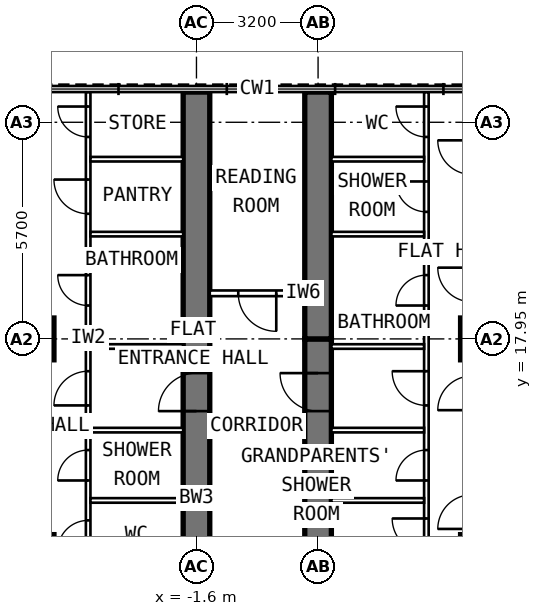
"""IFC4 building model, lengths in metres.
Left out: names, types, materials, properties, quantities, classifications, styles, units other than length and angle.
Written with IfcOpenShell. Run it as: python <this file> out.ifc"""

import sys

from ifc_helpers import new_model, si_unit, direction, frame, frame_2d, origin, origin_2d, place, context, subcontext, project, spatial, rectangle, extrude, element, fill, save


model = new_model("IFC4")
c1 = context("Model", 3, precision=1e-05, world=origin(), true_north=direction((0.0, 1.0)))
c2 = subcontext(c1, "Body", "Model", "MODEL_VIEW")
j1 = project(units=[si_unit("LENGTHUNIT", "METRE"), si_unit("PLANEANGLEUNIT", "RADIAN")], contexts=[c1])
p1 = place(None, origin())
s1 = spatial("IfcSite", under=j1, at=p1, CompositionType="ELEMENT")
p2 = place(p1, origin())
s2 = spatial("IfcBuilding", under=s1, at=p2, CompositionType="ELEMENT")
p3 = place(p2, frame((0.0, 0.0, 197.4)))
s3 = spatial("IfcBuildingStorey", under=s2, at=p3, CompositionType="ELEMENT", Elevation=197.4)
for number, where, z_axis, x_axis in (
    (1, (-5.9, 12.25, 0.0), (0.0, 0.0, 1.0), (0.0, 1.0, 0.0)),
    (2, (-5.9, 17.95, 0.0), (0.0, 0.0, 1.0), (0.0, 1.0, 0.0)),
    (3, (5.9, 12.25, 0.0), (0.0, 0.0, 1.0), (0.0, 1.0, 0.0)),
    (4, (5.9, 17.95, 0.0), (0.0, 0.0, 1.0), (0.0, 1.0, 0.0)),
):
    element("IfcColumn", number, at=place(p3, frame(where, z_axis=z_axis, x_axis=x_axis)), inside=s3, PredefinedType="COLUMN", context=c2, shape_type="SweptSolid", body=[
        extrude(rectangle(XDim=1.1, YDim=1.1, at=origin_2d()), origin(), (0.0, 0.0, 1.0), 3.6),
    ])
p4 = place(p3, frame((-1.6, 9.6, 0.0), z_axis=(0.0, 0.0, 1.0), x_axis=(0.0, 1.0, 0.0)))
e5 = element("IfcWall", 5, at=p4, inside=s3, PredefinedType="SHEAR", context=c2, shape_type="SweptSolid", body=[
    extrude(rectangle(XDim=8.35, YDim=0.7, at=frame_2d((4.175, 0.0))), origin(), (0.0, 0.0, 1.0), 3.6),
])
p5 = place(p4, frame((6.45, 0.0, 0.0)))
e6 = element("IfcOpeningElement", 6, at=p5, cuts=e5, PredefinedType="OPENING", context=c2, shape_type="SweptSolid", body=[
    extrude(rectangle(XDim=1.0, YDim=2.1, at=frame_2d((0.5, 1.05))), frame((0.0, 0.362, 0.0), z_axis=(0.0, -1.0, 0.0), x_axis=(1.0, 0.0, 0.0)), (0.0, 0.0, 1.0), 0.724),
])
p6 = place(p3, frame((-1.6, 17.95, 0.0), z_axis=(0.0, 0.0, 1.0), x_axis=(0.0, 1.0, 0.0)))
e7 = element("IfcWall", 7, at=p6, inside=s3, PredefinedType="SHEAR", context=c2, shape_type="SweptSolid", body=[
    extrude(rectangle(XDim=6.495, YDim=0.7, at=frame_2d((3.248, 0.0))), origin(), (0.0, 0.0, 1.0), 3.6),
])
p7 = place(p3, frame((1.6, 9.6, 0.0), z_axis=(0.0, 0.0, 1.0), x_axis=(0.0, 1.0, 0.0)))
e8 = element("IfcWall", 8, at=p7, inside=s3, PredefinedType="SHEAR", context=c2, shape_type="SweptSolid", body=[
    extrude(rectangle(XDim=8.35, YDim=0.7, at=frame_2d((4.175, 0.0))), origin(), (0.0, 0.0, 1.0), 3.6),
])
p8 = place(p7, frame((6.45, 0.0, 0.0)))
e9 = element("IfcOpeningElement", 9, at=p8, cuts=e8, PredefinedType="OPENING", context=c2, shape_type="SweptSolid", body=[
    extrude(rectangle(XDim=1.0, YDim=2.1, at=frame_2d((0.5, 1.05))), frame((0.0, 0.362, 0.0), z_axis=(0.0, -1.0, 0.0), x_axis=(1.0, 0.0, 0.0)), (0.0, 0.0, 1.0), 0.724),
])
p9 = place(p3, frame((1.6, 17.95, 0.0), z_axis=(0.0, 0.0, 1.0), x_axis=(0.0, 1.0, 0.0)))
e10 = element("IfcWall", 10, at=p9, inside=s3, PredefinedType="SHEAR", context=c2, shape_type="SweptSolid", body=[
    extrude(rectangle(XDim=6.495, YDim=0.7, at=frame_2d((3.248, 0.0))), origin(), (0.0, 0.0, 1.0), 3.6),
])
p10 = place(p3, frame((-4.45, 9.925, 0.0), z_axis=(0.0, 0.0, 1.0), x_axis=(0.0, 1.0, 0.0)))
e11 = element("IfcWall", 11, at=p10, inside=s3, PredefinedType="PARTITIONING", context=c2, shape_type="SweptSolid", body=[
    extrude(rectangle(XDim=14.52, YDim=0.12, at=frame_2d((7.26, 0.0))), origin(), (0.0, 0.0, 1.0), 3.35),
])
p11 = place(p10, frame((0.55, 0.0, 0.0)))
e12 = element("IfcOpeningElement", 12, at=p11, cuts=e11, PredefinedType="OPENING", context=c2, shape_type="SweptSolid", body=[
    extrude(rectangle(XDim=0.9, YDim=2.1, at=frame_2d((0.45, 1.05))), frame((0.0, 0.072, 0.0), z_axis=(0.0, -1.0, 0.0), x_axis=(1.0, 0.0, 0.0)), (0.0, 0.0, 1.0), 0.144),
])
p12 = place(p10, frame((2.45, 0.0, 0.0)))
e13 = element("IfcOpeningElement", 13, at=p12, cuts=e11, PredefinedType="OPENING", context=c2, shape_type="SweptSolid", body=[
    extrude(rectangle(XDim=0.8, YDim=2.1, at=frame_2d((0.4, 1.05))), frame((0.0, 0.072, 0.0), z_axis=(0.0, -1.0, 0.0), x_axis=(1.0, 0.0, 0.0)), (0.0, 0.0, 1.0), 0.144),
])
p13 = place(p10, frame((4.3, 0.0, 0.0)))
e14 = element("IfcOpeningElement", 14, at=p13, cuts=e11, PredefinedType="OPENING", context=c2, shape_type="SweptSolid", body=[
    extrude(rectangle(XDim=0.8, YDim=2.1, at=frame_2d((0.4, 1.05))), frame((0.0, 0.072, 0.0), z_axis=(0.0, -1.0, 0.0), x_axis=(1.0, 0.0, 0.0)), (0.0, 0.0, 1.0), 0.144),
])
p14 = place(p10, frame((6.275, 0.0, 0.0)))
e15 = element("IfcOpeningElement", 15, at=p14, cuts=e11, PredefinedType="OPENING", context=c2, shape_type="SweptSolid", body=[
    extrude(rectangle(XDim=0.9, YDim=2.1, at=frame_2d((0.45, 1.05))), frame((0.0, 0.072, 0.0), z_axis=(0.0, -1.0, 0.0), x_axis=(1.0, 0.0, 0.0)), (0.0, 0.0, 1.0), 0.144),
])
p15 = place(p10, frame((8.904, 0.0, 0.0)))
e16 = element("IfcOpeningElement", 16, at=p15, cuts=e11, PredefinedType="OPENING", context=c2, shape_type="SweptSolid", body=[
    extrude(rectangle(XDim=0.8, YDim=2.1, at=frame_2d((0.4, 1.05))), frame((0.0, 0.072, 0.0), z_axis=(0.0, -1.0, 0.0), x_axis=(1.0, 0.0, 0.0)), (0.0, 0.0, 1.0), 0.144),
])
p16 = place(p10, frame((11.318, 0.0, 0.0)))
e17 = element("IfcOpeningElement", 17, at=p16, cuts=e11, PredefinedType="OPENING", context=c2, shape_type="SweptSolid", body=[
    extrude(rectangle(XDim=0.9, YDim=2.1, at=frame_2d((0.45, 1.05))), frame((0.0, 0.072, 0.0), z_axis=(0.0, -1.0, 0.0), x_axis=(1.0, 0.0, 0.0)), (0.0, 0.0, 1.0), 0.144),
])
p17 = place(p10, frame((13.339, 0.0, 0.0)))
e18 = element("IfcOpeningElement", 18, at=p17, cuts=e11, PredefinedType="OPENING", context=c2, shape_type="SweptSolid", body=[
    extrude(rectangle(XDim=0.8, YDim=2.1, at=frame_2d((0.4, 1.05))), frame((0.0, 0.072, 0.0), z_axis=(0.0, -1.0, 0.0), x_axis=(1.0, 0.0, 0.0)), (0.0, 0.0, 1.0), 0.144),
])
for number, where, z_axis, x_axis in (
    (19, (-1.95, 13.7, 0.0), (0.0, 0.0, 1.0), (-1.0, 0.0, 0.0)),
    (20, (-1.95, 15.55, 0.0), (0.0, 0.0, 1.0), (-1.0, 0.0, 0.0)),
):
    element("IfcWall", number, at=place(p3, frame(where, z_axis=z_axis, x_axis=x_axis)), inside=s3, PredefinedType="PARTITIONING", context=c2, shape_type="SweptSolid", body=[
        extrude(rectangle(XDim=2.44, YDim=0.12, at=frame_2d((1.22, 0.0))), origin(), (0.0, 0.0, 1.0), 3.35),
    ])
p18 = place(p3, frame((-1.95, 17.75, 0.0), z_axis=(0.0, 0.0, 1.0), x_axis=(-1.0, 0.0, 0.0)))
e21 = element("IfcWall", 21, at=p18, inside=s3, PredefinedType="PARTITIONING", context=c2, shape_type="SweptSolid", body=[
    extrude(rectangle(XDim=2.44, YDim=0.12, at=frame_2d((1.22, 0.0))), origin(), (0.0, 0.0, 1.0), 2.45),
])
for number, where, z_axis, x_axis in (
    (22, (-1.95, 20.707, 0.0), (0.0, 0.0, 1.0), (-1.0, 0.0, 0.0)),
    (23, (-1.95, 22.678, 0.0), (0.0, 0.0, 1.0), (-1.0, 0.0, 0.0)),
):
    element("IfcWall", number, at=place(p3, frame(where, z_axis=z_axis, x_axis=x_axis)), inside=s3, PredefinedType="PARTITIONING", context=c2, shape_type="SweptSolid", body=[
        extrude(rectangle(XDim=2.44, YDim=0.12, at=frame_2d((1.22, 0.0))), origin(), (0.0, 0.0, 1.0), 3.35),
    ])
p19 = place(p3, frame((4.45, 9.925, 0.0), z_axis=(0.0, 0.0, 1.0), x_axis=(0.0, 1.0, 0.0)))
e24 = element("IfcWall", 24, at=p19, inside=s3, PredefinedType="PARTITIONING", context=c2, shape_type="SweptSolid", body=[
    extrude(rectangle(XDim=14.52, YDim=0.12, at=frame_2d((7.26, 0.0))), origin(), (0.0, 0.0, 1.0), 3.35),
])
p20 = place(p19, frame((0.6, 0.0, 0.0)))
e25 = element("IfcOpeningElement", 25, at=p20, cuts=e24, PredefinedType="OPENING", context=c2, shape_type="SweptSolid", body=[
    extrude(rectangle(XDim=0.8, YDim=2.1, at=frame_2d((0.4, 1.05))), frame((0.0, 0.072, 0.0), z_axis=(0.0, -1.0, 0.0), x_axis=(1.0, 0.0, 0.0)), (0.0, 0.0, 1.0), 0.144),
])
p21 = place(p19, frame((2.4, 0.0, 0.0)))
e26 = element("IfcOpeningElement", 26, at=p21, cuts=e24, PredefinedType="OPENING", context=c2, shape_type="SweptSolid", body=[
    extrude(rectangle(XDim=0.9, YDim=2.1, at=frame_2d((0.45, 1.05))), frame((0.0, 0.072, 0.0), z_axis=(0.0, -1.0, 0.0), x_axis=(1.0, 0.0, 0.0)), (0.0, 0.0, 1.0), 0.144),
])
p22 = place(p19, frame((4.3, 0.0, 0.0)))
e27 = element("IfcOpeningElement", 27, at=p22, cuts=e24, PredefinedType="OPENING", context=c2, shape_type="SweptSolid", body=[
    extrude(rectangle(XDim=0.8, YDim=2.1, at=frame_2d((0.4, 1.05))), frame((0.0, 0.072, 0.0), z_axis=(0.0, -1.0, 0.0), x_axis=(1.0, 0.0, 0.0)), (0.0, 0.0, 1.0), 0.144),
])
p23 = place(p19, frame((6.275, 0.0, 0.0)))
e28 = element("IfcOpeningElement", 28, at=p23, cuts=e24, PredefinedType="OPENING", context=c2, shape_type="SweptSolid", body=[
    extrude(rectangle(XDim=0.9, YDim=2.1, at=frame_2d((0.45, 1.05))), frame((0.0, 0.072, 0.0), z_axis=(0.0, -1.0, 0.0), x_axis=(1.0, 0.0, 0.0)), (0.0, 0.0, 1.0), 0.144),
])
p24 = place(p19, frame((8.904, 0.0, 0.0)))
e29 = element("IfcOpeningElement", 29, at=p24, cuts=e24, PredefinedType="OPENING", context=c2, shape_type="SweptSolid", body=[
    extrude(rectangle(XDim=0.8, YDim=2.1, at=frame_2d((0.4, 1.05))), frame((0.0, 0.072, 0.0), z_axis=(0.0, -1.0, 0.0), x_axis=(1.0, 0.0, 0.0)), (0.0, 0.0, 1.0), 0.144),
])
p25 = place(p19, frame((11.368, 0.0, 0.0)))
e30 = element("IfcOpeningElement", 30, at=p25, cuts=e24, PredefinedType="OPENING", context=c2, shape_type="SweptSolid", body=[
    extrude(rectangle(XDim=0.8, YDim=2.1, at=frame_2d((0.4, 1.05))), frame((0.0, 0.072, 0.0), z_axis=(0.0, -1.0, 0.0), x_axis=(1.0, 0.0, 0.0)), (0.0, 0.0, 1.0), 0.144),
])
p26 = place(p19, frame((13.339, 0.0, 0.0)))
e31 = element("IfcOpeningElement", 31, at=p26, cuts=e24, PredefinedType="OPENING", context=c2, shape_type="SweptSolid", body=[
    extrude(rectangle(XDim=0.8, YDim=2.1, at=frame_2d((0.4, 1.05))), frame((0.0, 0.072, 0.0), z_axis=(0.0, -1.0, 0.0), x_axis=(1.0, 0.0, 0.0)), (0.0, 0.0, 1.0), 0.144),
])
for number, where, z_axis, x_axis in (
    (32, (1.95, 13.7, 0.0), (0.0, 0.0, 1.0), (1.0, 0.0, 0.0)),
    (33, (1.95, 15.55, 0.0), (0.0, 0.0, 1.0), (1.0, 0.0, 0.0)),
):
    element("IfcWall", number, at=place(p3, frame(where, z_axis=z_axis, x_axis=x_axis)), inside=s3, PredefinedType="PARTITIONING", context=c2, shape_type="SweptSolid", body=[
        extrude(rectangle(XDim=2.44, YDim=0.12, at=frame_2d((1.22, 0.0))), origin(), (0.0, 0.0, 1.0), 3.35),
    ])
p27 = place(p3, frame((1.95, 17.75, 0.0), z_axis=(0.0, 0.0, 1.0), x_axis=(1.0, 0.0, 0.0)))
e34 = element("IfcWall", 34, at=p27, inside=s3, PredefinedType="PARTITIONING", context=c2, shape_type="SweptSolid", body=[
    extrude(rectangle(XDim=2.44, YDim=0.12, at=frame_2d((1.22, 0.0))), origin(), (0.0, 0.0, 1.0), 2.45),
])
for number, where, z_axis, x_axis in (
    (35, (1.95, 20.707, 0.0), (0.0, 0.0, 1.0), (1.0, 0.0, 0.0)),
    (36, (1.95, 22.678, 0.0), (0.0, 0.0, 1.0), (1.0, 0.0, 0.0)),
):
    element("IfcWall", number, at=place(p3, frame(where, z_axis=z_axis, x_axis=x_axis)), inside=s3, PredefinedType="PARTITIONING", context=c2, shape_type="SweptSolid", body=[
        extrude(rectangle(XDim=2.44, YDim=0.12, at=frame_2d((1.22, 0.0))), origin(), (0.0, 0.0, 1.0), 3.35),
    ])
p28 = place(p3, frame((1.25, 19.15, 0.0), z_axis=(0.0, 0.0, 1.0), x_axis=(-1.0, 0.0, 0.0)))
e37 = element("IfcWall", 37, at=p28, inside=s3, PredefinedType="PARTITIONING", context=c2, shape_type="SweptSolid", body=[
    extrude(rectangle(XDim=2.5, YDim=0.15, at=frame_2d((1.25, 0.0))), origin(), (0.0, 0.0, 1.0), 3.35),
])
p29 = place(p28, frame((0.75, 0.0, 0.0)))
e38 = element("IfcOpeningElement", 38, at=p29, cuts=e37, PredefinedType="OPENING", context=c2, shape_type="SweptSolid", body=[
    extrude(rectangle(XDim=1.0, YDim=2.1, at=frame_2d((0.5, 1.05))), frame((0.0, 0.087, 0.0), z_axis=(0.0, -1.0, 0.0), x_axis=(1.0, 0.0, 0.0)), (0.0, 0.0, 1.0), 0.174),
])
p30 = place(p5, origin())
e39 = element("IfcDoor", 39, at=p30, inside=s3, OperationType="SINGLE_SWING_LEFT", PredefinedType="DOOR", context=c2, shape_type="SweptSolid", body=[
    extrude(rectangle(XDim=1.0, YDim=2.1, at=frame_2d((0.5, 1.05))), frame((0.0, 0.1, 0.0), z_axis=(0.0, -1.0, 0.0), x_axis=(1.0, 0.0, 0.0)), (0.0, 0.0, 1.0), 0.2),
])
fill(e6, e39)
p31 = place(p12, origin())
e40 = element("IfcDoor", 40, at=p31, inside=s3, OperationType="SINGLE_SWING_LEFT", PredefinedType="DOOR", context=c2, shape_type="SweptSolid", body=[
    extrude(rectangle(XDim=0.8, YDim=2.1, at=frame_2d((0.4, 1.05))), frame((0.0, 0.025, 0.0), z_axis=(0.0, -1.0, 0.0), x_axis=(1.0, 0.0, 0.0)), (0.0, 0.0, 1.0), 0.05),
])
fill(e13, e40)
p32 = place(p13, origin())
e41 = element("IfcDoor", 41, at=p32, inside=s3, OperationType="SINGLE_SWING_LEFT", PredefinedType="DOOR", context=c2, shape_type="SweptSolid", body=[
    extrude(rectangle(XDim=0.8, YDim=2.1, at=frame_2d((0.4, 1.05))), frame((0.0, 0.025, 0.0), z_axis=(0.0, -1.0, 0.0), x_axis=(1.0, 0.0, 0.0)), (0.0, 0.0, 1.0), 0.05),
])
fill(e14, e41)
p33 = place(p14, origin())
e42 = element("IfcDoor", 42, at=p33, inside=s3, OperationType="SINGLE_SWING_LEFT", PredefinedType="DOOR", context=c2, shape_type="SweptSolid", body=[
    extrude(rectangle(XDim=0.9, YDim=2.1, at=frame_2d((0.45, 1.05))), frame((0.0, 0.025, 0.0), z_axis=(0.0, -1.0, 0.0), x_axis=(1.0, 0.0, 0.0)), (0.0, 0.0, 1.0), 0.05),
])
fill(e15, e42)
p34 = place(p15, origin())
e43 = element("IfcDoor", 43, at=p34, inside=s3, OperationType="SINGLE_SWING_RIGHT", PredefinedType="DOOR", context=c2, shape_type="SweptSolid", body=[
    extrude(rectangle(XDim=0.8, YDim=2.1, at=frame_2d((0.4, 1.05))), frame((0.0, 0.025, 0.0), z_axis=(0.0, -1.0, 0.0), x_axis=(1.0, 0.0, 0.0)), (0.0, 0.0, 1.0), 0.05),
])
fill(e16, e43)
p35 = place(p16, origin())
e44 = element("IfcDoor", 44, at=p35, inside=s3, OperationType="SINGLE_SWING_RIGHT", PredefinedType="DOOR", context=c2, shape_type="SweptSolid", body=[
    extrude(rectangle(XDim=0.9, YDim=2.1, at=frame_2d((0.45, 1.05))), frame((0.0, 0.025, 0.0), z_axis=(0.0, -1.0, 0.0), x_axis=(1.0, 0.0, 0.0)), (0.0, 0.0, 1.0), 0.05),
])
fill(e17, e44)
p36 = place(p17, origin())
e45 = element("IfcDoor", 45, at=p36, inside=s3, OperationType="SINGLE_SWING_RIGHT", PredefinedType="DOOR", context=c2, shape_type="SweptSolid", body=[
    extrude(rectangle(XDim=0.8, YDim=2.1, at=frame_2d((0.4, 1.05))), frame((0.0, 0.025, 0.0), z_axis=(0.0, -1.0, 0.0), x_axis=(1.0, 0.0, 0.0)), (0.0, 0.0, 1.0), 0.05),
])
fill(e18, e45)
p37 = place(p8, origin())
e46 = element("IfcDoor", 46, at=p37, inside=s3, OperationType="SINGLE_SWING_RIGHT", PredefinedType="DOOR", context=c2, shape_type="SweptSolid", body=[
    extrude(rectangle(XDim=1.0, YDim=2.1, at=frame_2d((0.5, 1.05))), frame((0.0, 0.1, 0.0), z_axis=(0.0, -1.0, 0.0), x_axis=(1.0, 0.0, 0.0)), (0.0, 0.0, 1.0), 0.2),
])
fill(e9, e46)
p38 = place(p21, origin())
e47 = element("IfcDoor", 47, at=p38, inside=s3, OperationType="SINGLE_SWING_RIGHT", PredefinedType="DOOR", context=c2, shape_type="SweptSolid", body=[
    extrude(rectangle(XDim=0.9, YDim=2.1, at=frame_2d((0.45, 1.05))), frame((0.0, 0.025, 0.0), z_axis=(0.0, -1.0, 0.0), x_axis=(1.0, 0.0, 0.0)), (0.0, 0.0, 1.0), 0.05),
])
fill(e26, e47)
p39 = place(p22, origin())
e48 = element("IfcDoor", 48, at=p39, inside=s3, OperationType="SINGLE_SWING_LEFT", PredefinedType="DOOR", context=c2, shape_type="SweptSolid", body=[
    extrude(rectangle(XDim=0.8, YDim=2.1, at=frame_2d((0.4, 1.05))), frame((0.0, 0.025, 0.0), z_axis=(0.0, -1.0, 0.0), x_axis=(1.0, 0.0, 0.0)), (0.0, 0.0, 1.0), 0.05),
])
fill(e27, e48)
p40 = place(p23, origin())
e49 = element("IfcDoor", 49, at=p40, inside=s3, OperationType="SINGLE_SWING_RIGHT", PredefinedType="DOOR", context=c2, shape_type="SweptSolid", body=[
    extrude(rectangle(XDim=0.9, YDim=2.1, at=frame_2d((0.45, 1.05))), frame((0.0, 0.025, 0.0), z_axis=(0.0, -1.0, 0.0), x_axis=(1.0, 0.0, 0.0)), (0.0, 0.0, 1.0), 0.05),
])
fill(e28, e49)
p41 = place(p24, origin())
e50 = element("IfcDoor", 50, at=p41, inside=s3, OperationType="SINGLE_SWING_LEFT", PredefinedType="DOOR", context=c2, shape_type="SweptSolid", body=[
    extrude(rectangle(XDim=0.8, YDim=2.1, at=frame_2d((0.4, 1.05))), frame((0.0, 0.025, 0.0), z_axis=(0.0, -1.0, 0.0), x_axis=(1.0, 0.0, 0.0)), (0.0, 0.0, 1.0), 0.05),
])
fill(e29, e50)
p42 = place(p25, origin())
e51 = element("IfcDoor", 51, at=p42, inside=s3, OperationType="SINGLE_SWING_RIGHT", PredefinedType="DOOR", context=c2, shape_type="SweptSolid", body=[
    extrude(rectangle(XDim=0.8, YDim=2.1, at=frame_2d((0.4, 1.05))), frame((0.0, 0.025, 0.0), z_axis=(0.0, -1.0, 0.0), x_axis=(1.0, 0.0, 0.0)), (0.0, 0.0, 1.0), 0.05),
])
fill(e30, e51)
p43 = place(p26, origin())
e52 = element("IfcDoor", 52, at=p43, inside=s3, OperationType="SINGLE_SWING_RIGHT", PredefinedType="DOOR", context=c2, shape_type="SweptSolid", body=[
    extrude(rectangle(XDim=0.8, YDim=2.1, at=frame_2d((0.4, 1.05))), frame((0.0, 0.025, 0.0), z_axis=(0.0, -1.0, 0.0), x_axis=(1.0, 0.0, 0.0)), (0.0, 0.0, 1.0), 0.05),
])
fill(e31, e52)
p44 = place(p29, origin())
e53 = element("IfcDoor", 53, at=p44, inside=s3, OperationType="SINGLE_SWING_LEFT", PredefinedType="DOOR", context=c2, shape_type="SweptSolid", body=[
    extrude(rectangle(XDim=1.0, YDim=2.1, at=frame_2d((0.5, 1.05))), frame((0.0, 0.025, 0.0), z_axis=(0.0, -1.0, 0.0), x_axis=(1.0, 0.0, 0.0)), (0.0, 0.0, 1.0), 0.05),
])
fill(e38, e53)
save(model, sys.argv[1])
